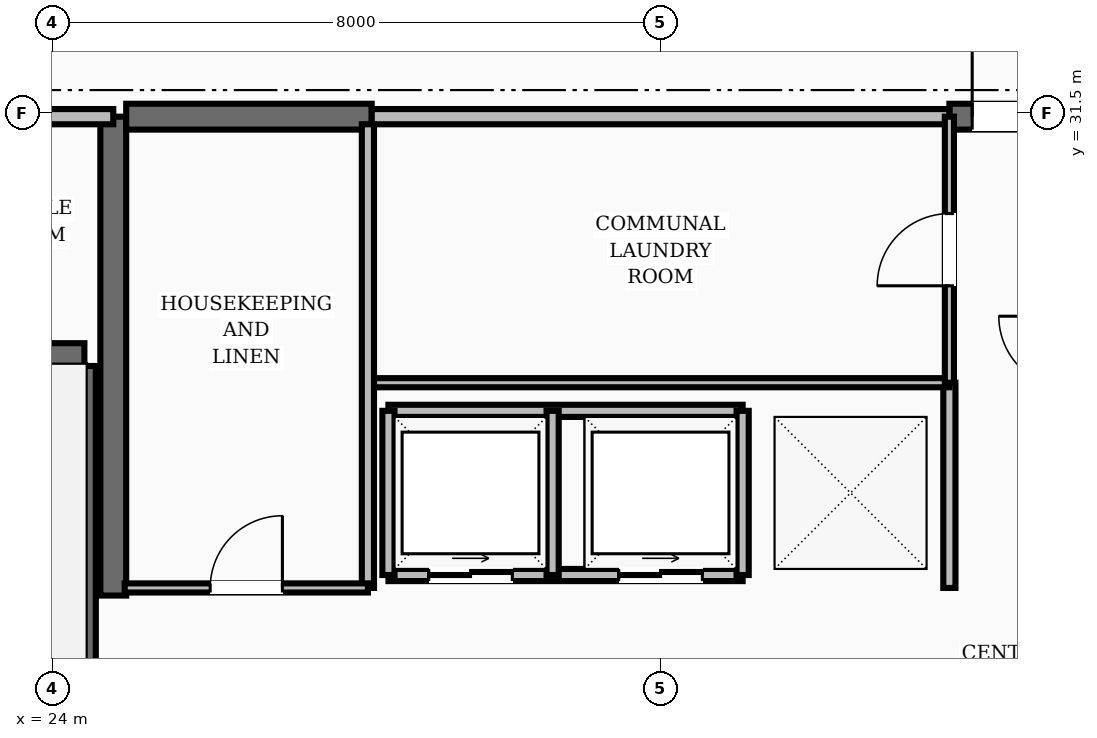
"""IFC4 building model, lengths in metres.
Left out: names, types, materials, properties, quantities, classifications, styles, units other than length and angle.
Written with IfcOpenShell. Run it as: python <this file> out.ifc"""

import sys

from ifc_helpers import new_model, si_unit, direction, frame, frame_2d, origin, place, context, subcontext, project, spatial, rectangle, extrude, element, fill, save


model = new_model("IFC4")
c1 = context("Model", 3, precision=1e-05, world=origin(), true_north=direction((0.0, 1.0)))
c2 = subcontext(c1, "Body", "Model", "MODEL_VIEW")
j1 = project(units=[si_unit("LENGTHUNIT", "METRE"), si_unit("PLANEANGLEUNIT", "RADIAN")], contexts=[c1])
p1 = place(None, origin())
s1 = spatial("IfcSite", under=j1, at=p1, CompositionType="ELEMENT")
p2 = place(p1, origin())
s2 = spatial("IfcBuilding", under=s1, at=p2, CompositionType="ELEMENT")
p3 = place(p2, frame((0.0, 0.0, 192.8)))
s3 = spatial("IfcBuildingStorey", under=s2, at=p3, CompositionType="ELEMENT", Elevation=192.8)
p4 = place(p3, frame((24.8, 25.15, 0.0), z_axis=(0.0, 0.0, 1.0), x_axis=(0.0, 1.0, 0.0)))
e1 = element("IfcWall", 1, at=p4, inside=s3, PredefinedType="SHEAR", context=c2, shape_type="SweptSolid", body=[
    extrude(rectangle(XDim=6.3, YDim=0.34, at=frame_2d((3.15, 0.0))), origin(), (0.0, 0.0, 1.0), 3.6),
])
p5 = place(p3, frame((24.97, 31.45, 0.0), z_axis=(0.0, 0.0, 1.0), x_axis=(1.0, 0.0, 0.0)))
e2 = element("IfcWall", 2, at=p5, inside=s3, PredefinedType="SHEAR", context=c2, shape_type="SweptSolid", body=[
    extrude(rectangle(XDim=3.23, YDim=0.34, at=frame_2d((1.615, 0.0))), origin(), (0.0, 0.0, 1.0), 3.6),
])
p6 = place(p3, frame((35.8, 31.45, 0.0), z_axis=(0.0, 0.0, 1.0), x_axis=(1.0, 0.0, 0.0)))
e3 = element("IfcWall", 3, at=p6, inside=s3, PredefinedType="SHEAR", context=c2, shape_type="SweptSolid", body=[
    extrude(rectangle(XDim=3.23, YDim=0.34, at=frame_2d((1.615, 0.0))), origin(), (0.0, 0.0, 1.0), 3.6),
])
p7 = place(p6, frame((0.3, 0.0, 0.0)))
e4 = element("IfcOpeningElement", 4, at=p7, cuts=e3, PredefinedType="OPENING", context=c2, shape_type="SweptSolid", body=[
    extrude(rectangle(XDim=1.1, YDim=2.1, at=frame_2d((0.55, 1.05))), frame((0.0, 0.18, 0.0), z_axis=(0.0, -1.0, 0.0), x_axis=(1.0, 0.0, 0.0)), (0.0, 0.0, 1.0), 0.36),
])
p8 = place(p3, frame((24.42, 19.43, 0.0), z_axis=(0.0, 0.0, 1.0), x_axis=(0.0, 1.0, 0.0)))
e5 = element("IfcWall", 5, at=p8, inside=s3, PredefinedType="SHEAR", context=c2, shape_type="SweptSolid", body=[
    extrude(rectangle(XDim=8.74, YDim=0.3, at=frame_2d((4.37, 0.0))), origin(), (0.0, 0.0, 1.0), 3.6),
])
p9 = place(p3, frame((20.82, 28.32, 0.0), z_axis=(0.0, 0.0, 1.0), x_axis=(1.0, 0.0, 0.0)))
e6 = element("IfcWall", 6, at=p9, inside=s3, PredefinedType="SHEAR", context=c2, shape_type="SweptSolid", body=[
    extrude(rectangle(XDim=3.6, YDim=0.3, at=frame_2d((1.8, 0.0))), origin(), (0.0, 0.0, 1.0), 3.6),
])
p10 = place(p3, frame((20.82, 31.45, 0.0), z_axis=(0.0, 0.0, 1.0), x_axis=(1.0, 0.0, 0.0)))
e7 = element("IfcWall", 7, at=p10, inside=s3, PredefinedType="SOLIDWALL", context=c2, shape_type="SweptSolid", body=[
    extrude(rectangle(XDim=3.98, YDim=0.2, at=frame_2d((1.99, 0.0))), origin(), (0.0, 0.0, 1.0), 2.8),
])
p11 = place(p3, frame((35.8, 25.25, 0.0), z_axis=(0.0, 0.0, 1.0), x_axis=(0.0, 1.0, 0.0)))
e8 = element("IfcWall", 8, at=p11, inside=s3, PredefinedType="SOLIDWALL", context=c2, shape_type="SweptSolid", body=[
    extrude(rectangle(XDim=2.7, YDim=0.16, at=frame_2d((1.35, 0.0))), origin(), (0.0, 0.0, 1.0), 2.8),
])
p12 = place(p3, frame((28.42, 25.42, 0.0), z_axis=(0.0, 0.0, 1.0), x_axis=(1.0, 0.0, 0.0)))
e9 = element("IfcWall", 9, at=p12, inside=s3, PredefinedType="SOLIDWALL", context=c2, shape_type="SweptSolid", body=[
    extrude(rectangle(XDim=4.66, YDim=0.16, at=frame_2d((2.33, 0.0))), origin(), (0.0, 0.0, 1.0), 2.8),
])
p13 = place(p12, frame((0.53, 0.0, 0.0)))
e10 = element("IfcOpeningElement", 10, at=p13, cuts=e9, PredefinedType="OPENING", context=c2, shape_type="SweptSolid", body=[
    extrude(rectangle(XDim=1.1, YDim=2.15, at=frame_2d((0.55, 1.075))), frame((0.0, 0.09, 0.0), z_axis=(0.0, -1.0, 0.0), x_axis=(1.0, 0.0, 0.0)), (0.0, 0.0, 1.0), 0.18),
])
p14 = place(p12, frame((3.03, 0.0, 0.0)))
e11 = element("IfcOpeningElement", 11, at=p14, cuts=e9, PredefinedType="OPENING", context=c2, shape_type="SweptSolid", body=[
    extrude(rectangle(XDim=1.1, YDim=2.15, at=frame_2d((0.55, 1.075))), frame((0.0, 0.09, 0.0), z_axis=(0.0, -1.0, 0.0), x_axis=(1.0, 0.0, 0.0)), (0.0, 0.0, 1.0), 0.18),
])
p15 = place(p3, frame((28.42, 27.58, 0.0), z_axis=(0.0, 0.0, 1.0), x_axis=(1.0, 0.0, 0.0)))
e12 = element("IfcWall", 12, at=p15, inside=s3, PredefinedType="SOLIDWALL", context=c2, shape_type="SweptSolid", body=[
    extrude(rectangle(XDim=4.66, YDim=0.16, at=frame_2d((2.33, 0.0))), origin(), (0.0, 0.0, 1.0), 2.8),
])
for number, where, z_axis, x_axis in (
    (13, (28.42, 25.42, 0.0), (0.0, 0.0, 1.0), (0.0, 1.0, 0.0)),
    (14, (30.58, 25.42, 0.0), (0.0, 0.0, 1.0), (0.0, 1.0, 0.0)),
    (15, (33.08, 25.42, 0.0), (0.0, 0.0, 1.0), (0.0, 1.0, 0.0)),
):
    element("IfcWall", number, at=place(p3, frame(where, z_axis=z_axis, x_axis=x_axis)), inside=s3, PredefinedType="SOLIDWALL", context=c2, shape_type="SweptSolid", body=[
        extrude(rectangle(XDim=2.16, YDim=0.16, at=frame_2d((1.08, 0.0))), origin(), (0.0, 0.0, 1.0), 2.8),
    ])
p16 = place(p3, frame((28.2, 31.45, 0.0), z_axis=(0.0, 0.0, 1.0), x_axis=(1.0, 0.0, 0.0)))
e16 = element("IfcWall", 16, at=p16, inside=s3, PredefinedType="SOLIDWALL", context=c2, shape_type="SweptSolid", body=[
    extrude(rectangle(XDim=7.6, YDim=0.2, at=frame_2d((3.8, 0.0))), origin(), (0.0, 0.0, 1.0), 2.8),
])
p17 = place(p3, frame((28.2, 27.95, 0.0), z_axis=(0.0, 0.0, 1.0), x_axis=(1.0, 0.0, 0.0)))
e17 = element("IfcWall", 17, at=p17, inside=s3, PredefinedType="PARTITIONING", context=c2, shape_type="SweptSolid", body=[
    extrude(rectangle(XDim=7.6, YDim=0.12, at=frame_2d((3.8, 0.0))), origin(), (0.0, 0.0, 1.0), 2.8),
])
p18 = place(p3, frame((35.8, 27.95, 0.0), z_axis=(0.0, 0.0, 1.0), x_axis=(0.0, 1.0, 0.0)))
e18 = element("IfcWall", 18, at=p18, inside=s3, PredefinedType="PARTITIONING", context=c2, shape_type="SweptSolid", body=[
    extrude(rectangle(XDim=3.5, YDim=0.12, at=frame_2d((1.75, 0.0))), origin(), (0.0, 0.0, 1.0), 2.8),
])
p19 = place(p18, frame((1.275, 0.0, 0.0)))
e19 = element("IfcOpeningElement", 19, at=p19, cuts=e18, PredefinedType="OPENING", context=c2, shape_type="SweptSolid", body=[
    extrude(rectangle(XDim=0.95, YDim=2.1, at=frame_2d((0.475, 1.05))), frame((0.0, 0.07, 0.0), z_axis=(0.0, -1.0, 0.0), x_axis=(1.0, 0.0, 0.0)), (0.0, 0.0, 1.0), 0.14),
])
p20 = place(p3, frame((28.15, 25.25, 0.0), z_axis=(0.0, 0.0, 1.0), x_axis=(0.0, 1.0, 0.0)))
e20 = element("IfcWall", 20, at=p20, inside=s3, PredefinedType="SOLIDWALL", context=c2, shape_type="SweptSolid", body=[
    extrude(rectangle(XDim=6.1, YDim=0.16, at=frame_2d((3.05, 0.0))), origin(), (0.0, 0.0, 1.0), 2.8),
])
p21 = place(p3, frame((24.95, 25.25, 0.0), z_axis=(0.0, 0.0, 1.0), x_axis=(1.0, 0.0, 0.0)))
e21 = element("IfcWall", 21, at=p21, inside=s3, PredefinedType="PARTITIONING", context=c2, shape_type="SweptSolid", body=[
    extrude(rectangle(XDim=3.2, YDim=0.12, at=frame_2d((1.6, 0.0))), origin(), (0.0, 0.0, 1.0), 2.8),
])
p22 = place(p21, frame((1.125, 0.0, 0.0)))
e22 = element("IfcOpeningElement", 22, at=p22, cuts=e21, PredefinedType="OPENING", context=c2, shape_type="SweptSolid", body=[
    extrude(rectangle(XDim=0.95, YDim=2.1, at=frame_2d((0.475, 1.05))), frame((0.0, 0.07, 0.0), z_axis=(0.0, -1.0, 0.0), x_axis=(1.0, 0.0, 0.0)), (0.0, 0.0, 1.0), 0.14),
])
p23 = place(p7, origin())
e23 = element("IfcDoor", 23, at=p23, inside=s3, OperationType="SINGLE_SWING_LEFT", PredefinedType="DOOR", context=c2, shape_type="SweptSolid", body=[
    extrude(rectangle(XDim=1.1, YDim=2.1, at=frame_2d((0.55, 1.05))), frame((0.0, 0.025, 0.0), z_axis=(0.0, -1.0, 0.0), x_axis=(1.0, 0.0, 0.0)), (0.0, 0.0, 1.0), 0.05),
])
fill(e4, e23)
p24 = place(p13, origin())
e24 = element("IfcDoor", 24, at=p24, inside=s3, OperationType="SLIDING_TO_RIGHT", PredefinedType="DOOR", context=c2, shape_type="SweptSolid", body=[
    extrude(rectangle(XDim=1.1, YDim=2.15, at=frame_2d((0.55, 1.075))), frame((0.0, 0.025, 0.0), z_axis=(0.0, -1.0, 0.0), x_axis=(1.0, 0.0, 0.0)), (0.0, 0.0, 1.0), 0.05),
])
fill(e10, e24)
p25 = place(p14, origin())
e25 = element("IfcDoor", 25, at=p25, inside=s3, OperationType="SLIDING_TO_RIGHT", PredefinedType="DOOR", context=c2, shape_type="SweptSolid", body=[
    extrude(rectangle(XDim=1.1, YDim=2.15, at=frame_2d((0.55, 1.075))), frame((0.0, 0.025, 0.0), z_axis=(0.0, -1.0, 0.0), x_axis=(1.0, 0.0, 0.0)), (0.0, 0.0, 1.0), 0.05),
])
fill(e11, e25)
p26 = place(p19, origin())
e26 = element("IfcDoor", 26, at=p26, inside=s3, OperationType="SINGLE_SWING_LEFT", PredefinedType="DOOR", context=c2, shape_type="SweptSolid", body=[
    extrude(rectangle(XDim=0.95, YDim=2.1, at=frame_2d((0.475, 1.05))), frame((0.0, 0.025, 0.0), z_axis=(0.0, -1.0, 0.0), x_axis=(1.0, 0.0, 0.0)), (0.0, 0.0, 1.0), 0.05),
])
fill(e19, e26)
p27 = place(p22, origin())
e27 = element("IfcDoor", 27, at=p27, inside=s3, OperationType="SINGLE_SWING_RIGHT", PredefinedType="DOOR", context=c2, shape_type="SweptSolid", body=[
    extrude(rectangle(XDim=0.95, YDim=2.1, at=frame_2d((0.475, 1.05))), frame((0.0, 0.025, 0.0), z_axis=(0.0, -1.0, 0.0), x_axis=(1.0, 0.0, 0.0)), (0.0, 0.0, 1.0), 0.05),
])
fill(e22, e27)
save(model, sys.argv[1])
